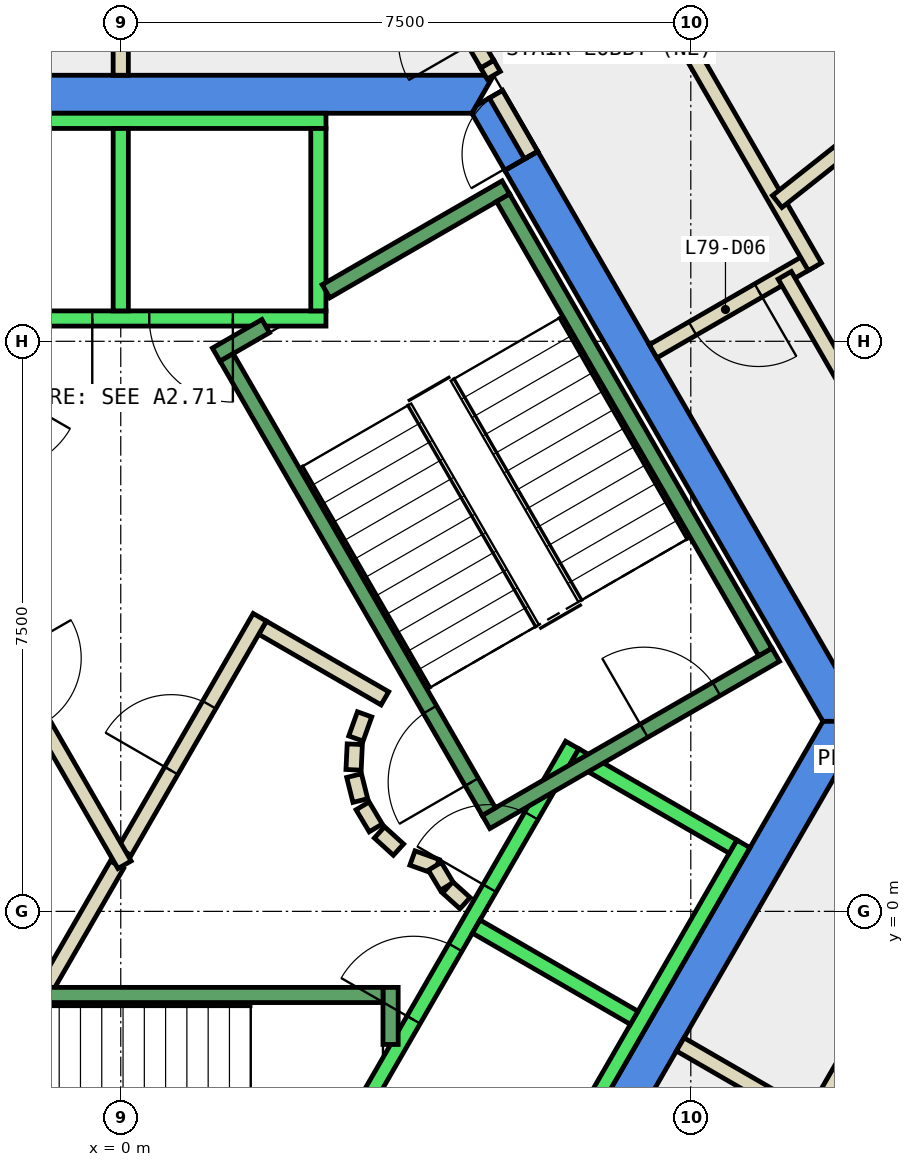
"""IFC4 building model, lengths in metres.
Left out: names, types, materials, properties, quantities, classifications, styles, units other than length and angle.
Written with IfcOpenShell. Run it as: python <this file> out.ifc"""

import sys

from ifc_helpers import new_model, si_unit, direction, frame, frame_2d, origin, place, context, subcontext, project, spatial, polyline, rectangle, outline, extrude, element, fill, save


model = new_model("IFC4")
c1 = context("Model", 3, precision=1e-05, world=origin(), true_north=direction((0.0, 1.0)))
c2 = subcontext(c1, "Body", "Model", "MODEL_VIEW")
j1 = project(units=[si_unit("LENGTHUNIT", "METRE"), si_unit("PLANEANGLEUNIT", "RADIAN")], contexts=[c1])
p1 = place(None, origin())
s1 = spatial("IfcSite", under=j1, at=p1, CompositionType="ELEMENT")
p2 = place(p1, origin())
s2 = spatial("IfcBuilding", under=s1, at=p2, CompositionType="ELEMENT")
p3 = place(p2, frame((0.0, 0.0, 335.9)))
s3 = spatial("IfcBuildingStorey", under=s2, at=p3, CompositionType="ELEMENT", Elevation=335.9)
p4 = place(p3, frame((0.0, 0.0, -0.35)))
e1 = element("IfcWall", 1, at=p4, inside=s3, PredefinedType="SHEAR", context=c2, shape_type="SweptSolid", body=[
    extrude(outline(polyline([(5.486, 9.998), (5.053, 9.748), (9.238, 2.5), (9.815, 2.5), (5.486, 9.998)])), origin(), (0.0, 0.0, 1.0), 4.4),
])
p5 = place(p3, frame((0.0, 0.0, 3.6)))
e2 = element("IfcWall", 2, at=p5, inside=s3, PredefinedType="SHEAR", context=c2, shape_type="SweptSolid", body=[
    extrude(outline(polyline([(5.022, 10.8), (4.677, 10.601), (4.619, 10.5), (5.053, 9.748), (5.486, 9.998), (5.022, 10.8)])), origin(), (0.0, 0.0, 1.0), 0.45),
])
p6 = place(p3, frame((0.0, 0.0, -0.35)))
e3 = element("IfcWall", 3, at=p6, inside=s3, PredefinedType="SHEAR", context=c2, shape_type="SweptSolid", body=[
    extrude(outline(polyline([(4.907, 11.0), (-4.907, 11.0), (-4.619, 10.5), (4.619, 10.5), (4.907, 11.0)])), origin(), (0.0, 0.0, 1.0), 4.4),
])
p7 = place(p3, frame((0.0, 0.0, -0.35)))
e4 = element("IfcWall", 4, at=p7, inside=s3, PredefinedType="SHEAR", context=c2, shape_type="SweptSolid", body=[
    extrude(outline(polyline([(4.907, -6.0), (9.815, 2.5), (9.238, 2.5), (4.619, -5.5), (4.907, -6.0)])), origin(), (0.0, 0.0, 1.0), 4.4),
])
p8 = place(p3, frame((-0.982, -1.0, 0.0), z_axis=(0.0, 0.0, 1.0), x_axis=(0.50024047865, 0.865886518847, 0.0)))
e5 = element("IfcWall", 5, at=p8, inside=s3, PredefinedType="PARTITIONING", context=c2, shape_type="SweptSolid", body=[
    extrude(rectangle(XDim=1.863, YDim=0.2, at=frame_2d((0.931, 0.0))), origin(), (0.0, 0.0, 1.0), 4.05),
])
p9 = place(p3, frame((1.866, 3.732, 0.0), z_axis=(0.0, 0.0, 1.0), x_axis=(0.866043361281, -0.499968895414, 0.0)))
e6 = element("IfcWall", 6, at=p9, inside=s3, PredefinedType="PARTITIONING", context=c2, shape_type="SweptSolid", body=[
    extrude(rectangle(XDim=1.858, YDim=0.2, at=frame_2d((0.929, 0.0))), origin(), (0.0, 0.0, 1.0), 4.05),
])
p10 = place(p3, frame((3.208, 2.592, 0.0), z_axis=(0.0, 0.0, 1.0), x_axis=(-0.337388820924, -0.941365382578, 0.0)))
e7 = element("IfcWall", 7, at=p10, inside=s3, PredefinedType="PARTITIONING", context=c2, shape_type="SweptSolid", body=[
    extrude(rectangle(XDim=0.338, YDim=0.2, at=frame_2d((0.169, 0.0))), origin(), (0.0, 0.0, 1.0), 4.05),
])
p11 = place(p3, frame((3.079, 2.199, 0.0), z_axis=(0.0, 0.0, 1.0), x_axis=(-0.047771483479, -0.998858290933, 0.0)))
e8 = element("IfcWall", 8, at=p11, inside=s3, PredefinedType="PARTITIONING", context=c2, shape_type="SweptSolid", body=[
    extrude(rectangle(XDim=0.337, YDim=0.2, at=frame_2d((0.169, 0.0))), origin(), (0.0, 0.0, 1.0), 4.05),
])
p12 = place(p3, frame((3.07, 1.786, 0.0), z_axis=(0.0, 0.0, 1.0), x_axis=(0.242705583207, -0.970099994784, 0.0)))
e9 = element("IfcWall", 9, at=p12, inside=s3, PredefinedType="PARTITIONING", context=c2, shape_type="SweptSolid", body=[
    extrude(rectangle(XDim=0.338, YDim=0.2, at=frame_2d((0.169, 0.0))), origin(), (0.0, 0.0, 1.0), 4.05),
])
for number, where, z_axis, x_axis in (
    (10, (3.182, 1.388, 0.0), (0.0, 0.0, 1.0), (0.512, -0.859, 0.0)),
    (11, (3.404, 1.039, 0.0), (0.0, 0.0, 1.0), (0.74, -0.672, 0.0)),
):
    element("IfcWall", number, at=place(p3, frame(where, z_axis=z_axis, x_axis=x_axis)), inside=s3, PredefinedType="PARTITIONING", context=c2, shape_type="SweptSolid", body=[
        extrude(rectangle(XDim=0.338, YDim=0.2, at=frame_2d((0.169, 0.0))), origin(), (0.0, 0.0, 1.0), 4.05),
    ])
p13 = place(p3, frame((3.838, 0.702, 0.0), z_axis=(0.0, 0.0, 1.0), x_axis=(0.941035081519, -0.338308993895, 0.0)))
e12 = element("IfcWall", 12, at=p13, inside=s3, PredefinedType="PARTITIONING", context=c2, shape_type="SweptSolid", body=[
    extrude(rectangle(XDim=0.337, YDim=0.2, at=frame_2d((0.168, 0.0))), origin(), (0.0, 0.0, 1.0), 4.05),
])
p14 = place(p3, frame((4.132, 0.593, 0.0), z_axis=(0.0, 0.0, 1.0), x_axis=(0.513561617048, -0.858052717201, 0.0)))
e13 = element("IfcWall", 13, at=p14, inside=s3, PredefinedType="PARTITIONING", context=c2, shape_type="SweptSolid", body=[
    extrude(rectangle(XDim=0.308, YDim=0.2, at=frame_2d((0.154, 0.0))), origin(), (0.0, 0.0, 1.0), 4.05),
])
p15 = place(p3, frame((4.301, 0.315, 0.0), z_axis=(0.0, 0.0, 1.0), x_axis=(0.741798017506, -0.670623367639, 0.0)))
e14 = element("IfcWall", 14, at=p15, inside=s3, PredefinedType="PARTITIONING", context=c2, shape_type="SweptSolid", body=[
    extrude(rectangle(XDim=0.309, YDim=0.2, at=frame_2d((0.154, 0.0))), origin(), (0.0, 0.0, 1.0), 4.05),
])
p16 = place(p3, frame((0.05, 0.787, 0.0), z_axis=(0.0, 0.0, 1.0), x_axis=(0.499954076797, 0.866051915934, 0.0)))
e15 = element("IfcWall", 15, at=p16, inside=s3, PredefinedType="PARTITIONING", context=c2, shape_type="SweptSolid", body=[
    extrude(rectangle(XDim=3.558, YDim=0.2, at=frame_2d((1.779, 0.0))), origin(), (0.0, 0.0, 1.0), 4.05),
])
p17 = place(p16, frame((1.229, 0.0, 0.0)))
e16 = element("IfcOpeningElement", 16, at=p17, cuts=e15, PredefinedType="OPENING", context=c2, shape_type="SweptSolid", body=[
    extrude(rectangle(XDim=1.0, YDim=2.1, at=frame_2d((0.5, 1.05))), frame((0.0, 0.11, 0.0), z_axis=(0.0, -1.0, 0.0), x_axis=(1.0, 0.0, 0.0)), (0.0, 0.0, 1.0), 0.22),
])
p18 = place(p3, frame((-2.54, 5.1, 0.0), z_axis=(0.0, 0.0, 1.0), x_axis=(0.499925051871, -0.866068670783, 0.0)))
e17 = element("IfcWall", 17, at=p18, inside=s3, PredefinedType="PARTITIONING", context=c2, shape_type="SweptSolid", body=[
    extrude(rectangle(XDim=5.181, YDim=0.2, at=frame_2d((2.59, 0.0))), origin(), (0.0, 0.0, 1.0), 4.05),
])
p19 = place(p18, frame((2.04, 0.0, 0.0)))
e18 = element("IfcOpeningElement", 18, at=p19, cuts=e17, PredefinedType="OPENING", context=c2, shape_type="SweptSolid", body=[
    extrude(rectangle(XDim=1.0, YDim=2.1, at=frame_2d((0.5, 1.05))), frame((0.0, 0.11, 0.0), z_axis=(0.0, -1.0, 0.0), x_axis=(1.0, 0.0, 0.0)), (0.0, 0.0, 1.0), 0.22),
])
p20 = place(p3, frame((7.361, -1.75, 0.0), z_axis=(0.0, 0.0, 1.0), x_axis=(0.865980106173, -0.500078449558, 0.0)))
e19 = element("IfcWall", 19, at=p20, inside=s3, PredefinedType="PARTITIONING", context=c2, shape_type="SweptSolid", body=[
    extrude(rectangle(XDim=1.9, YDim=0.2, at=frame_2d((0.95, 0.0))), origin(), (0.0, 0.0, 1.0), 4.05),
])
p21 = place(p3, frame((9.082, 8.568, 0.0), z_axis=(0.0, 0.0, 1.0), x_axis=(-0.865955154139, -0.50012165622, 0.0)))
e20 = element("IfcWall", 20, at=p21, inside=s3, PredefinedType="PARTITIONING", context=c2, shape_type="SweptSolid", body=[
    extrude(rectangle(XDim=2.4, YDim=0.2, at=frame_2d((1.2, 0.0))), origin(), (0.0, 0.0, 1.0), 4.05),
])
p22 = place(p21, frame((0.8, 0.0, 0.0)))
e21 = element("IfcOpeningElement", 21, at=p22, cuts=e20, PredefinedType="OPENING", context=c2, shape_type="SweptSolid", body=[
    extrude(rectangle(XDim=1.0, YDim=2.1, at=frame_2d((0.5, 1.05))), frame((0.0, 0.11, 0.0), z_axis=(0.0, -1.0, 0.0), x_axis=(1.0, 0.0, 0.0)), (0.0, 0.0, 1.0), 0.22),
])
p23 = place(p3, frame((4.907, 11.0, 0.0), z_axis=(0.0, 0.0, 1.0), x_axis=(-0.5004692653, 0.865754303766, 0.0)))
e22 = element("IfcWall", 22, at=p23, inside=s3, PredefinedType="PARTITIONING", context=c2, shape_type="SweptSolid", body=[
    extrude(rectangle(XDim=0.17, YDim=0.2, at=frame_2d((0.085, 0.0))), origin(), (0.0, 0.0, 1.0), 2.4),
])
p24 = place(p3, frame((8.736, 8.368, 0.0), z_axis=(0.0, 0.0, 1.0), x_axis=(0.500206302225, -0.865906262372, 0.0)))
e23 = element("IfcWall", 23, at=p24, inside=s3, PredefinedType="PARTITIONING", context=c2, shape_type="SweptSolid", body=[
    extrude(rectangle(XDim=2.111, YDim=0.2, at=frame_2d((1.055, 0.0))), origin(), (0.0, 0.0, 1.0), 4.05),
])
p25 = place(p3, frame((0.0, 11.0, 0.0), z_axis=(0.0, 0.0, 1.0), x_axis=(0.0, 1.0, 0.0)))
e24 = element("IfcWall", 24, at=p25, inside=s3, PredefinedType="PARTITIONING", context=c2, shape_type="SweptSolid", body=[
    extrude(rectangle(XDim=1.9, YDim=0.2, at=frame_2d((0.95, 0.0))), origin(), (0.0, 0.0, 1.0), 1.95),
])
p26 = place(p3, frame((5.399, 9.948, 0.0), z_axis=(0.0, 0.0, 1.0), x_axis=(-0.499882215713, 0.866093395895, 0.0)))
e25 = element("IfcWall", 25, at=p26, inside=s3, PredefinedType="PARTITIONING", context=c2, shape_type="SweptSolid", body=[
    extrude(rectangle(XDim=0.926, YDim=0.2, at=frame_2d((0.463, 0.0))), origin(), (0.0, 0.0, 1.0), 2.4),
])
p27 = place(p26, frame((0.017, 0.0, 0.0)))
e26 = element("IfcOpeningElement", 26, at=p27, cuts=e25, PredefinedType="OPENING", context=c2, shape_type="SweptSolid", body=[
    extrude(rectangle(XDim=0.9, YDim=2.1, at=frame_2d((0.45, 1.05))), frame((0.0, 0.11, 0.0), z_axis=(0.0, -1.0, 0.0), x_axis=(1.0, 0.0, 0.0)), (0.0, 0.0, 1.0), 0.22),
])
p28 = place(p3, frame((4.822, 11.147, 0.0), z_axis=(0.0, 0.0, 1.0), x_axis=(-0.499871764879, 0.866099427708, 0.0)))
e27 = element("IfcWall", 27, at=p28, inside=s3, PredefinedType="PARTITIONING", context=c2, shape_type="SweptSolid", body=[
    extrude(rectangle(XDim=2.737, YDim=0.2, at=frame_2d((1.368, 0.0))), origin(), (0.0, 0.0, 1.0), 4.05),
])
p29 = place(p28, frame((0.335, 0.0, 0.0)))
e28 = element("IfcOpeningElement", 28, at=p29, cuts=e27, PredefinedType="OPENING", context=c2, shape_type="SweptSolid", body=[
    extrude(rectangle(XDim=1.0, YDim=2.1, at=frame_2d((0.5, 1.05))), frame((0.0, 0.11, 0.0), z_axis=(0.0, -1.0, 0.0), x_axis=(1.0, 0.0, 0.0)), (0.0, 0.0, 1.0), 0.22),
])
p30 = place(p3, frame((7.43, 11.429, 0.0), z_axis=(0.0, 0.0, 1.0), x_axis=(0.500026652407, -0.866010015463, 0.0)))
e29 = element("IfcWall", 29, at=p30, inside=s3, PredefinedType="PARTITIONING", context=c2, shape_type="SweptSolid", body=[
    extrude(rectangle(XDim=3.404, YDim=0.2, at=frame_2d((1.702, 0.0))), origin(), (0.0, 0.0, 1.0), 4.05),
])
p31 = place(p3, frame((9.548, -1.962, 0.0), z_axis=(0.0, 0.0, 1.0), x_axis=(-0.500063042646, -0.865989003036, 0.0)))
e30 = element("IfcWall", 30, at=p31, inside=s3, PredefinedType="PARTITIONING", context=c2, shape_type="SweptSolid", body=[
    extrude(rectangle(XDim=0.91, YDim=0.2, at=frame_2d((0.455, 0.0))), origin(), (0.0, 0.0, 1.0), 4.05),
])
p32 = place(p3, frame((11.007, 11.215, 0.0), z_axis=(0.0, 0.0, 1.0), x_axis=(-0.784104781382, -0.620628465198, 0.0)))
e31 = element("IfcWall", 31, at=p32, inside=s3, PredefinedType="PARTITIONING", context=c2, shape_type="SweptSolid", body=[
    extrude(rectangle(XDim=3.023, YDim=0.2, at=frame_2d((1.511, 0.0))), origin(), (0.0, 0.0, 1.0), 4.05),
])
p33 = place(p3, frame((2.7, 7.8, 0.0), z_axis=(0.0, 0.0, 1.0), x_axis=(-1.0, 0.0, 0.0)))
e32 = element("IfcWall", 32, at=p33, inside=s3, PredefinedType="STANDARD", context=c2, shape_type="SweptSolid", body=[
    extrude(rectangle(XDim=5.4, YDim=0.2, at=frame_2d((2.7, 0.0))), origin(), (0.0, 0.0, 1.0), 4.05),
])
p34 = place(p33, frame((1.225, 0.0, 0.0)))
e33 = element("IfcOpeningElement", 33, at=p34, cuts=e32, PredefinedType="OPENING", context=c2, shape_type="SweptSolid", body=[
    extrude(rectangle(XDim=1.1, YDim=2.1, at=frame_2d((0.55, 1.05))), frame((0.0, 0.11, 0.0), z_axis=(0.0, -1.0, 0.0), x_axis=(1.0, 0.0, 0.0)), (0.0, 0.0, 1.0), 0.22),
])
p35 = place(p33, frame((3.075, 0.0, 0.0)))
e34 = element("IfcOpeningElement", 34, at=p35, cuts=e32, PredefinedType="OPENING", context=c2, shape_type="SweptSolid", body=[
    extrude(rectangle(XDim=1.1, YDim=2.1, at=frame_2d((0.55, 1.05))), frame((0.0, 0.11, 0.0), z_axis=(0.0, -1.0, 0.0), x_axis=(1.0, 0.0, 0.0)), (0.0, 0.0, 1.0), 0.22),
])
p36 = place(p3, frame((2.7, 10.4, 0.0), z_axis=(0.0, 0.0, 1.0), x_axis=(-1.0, 0.0, 0.0)))
e35 = element("IfcWall", 35, at=p36, inside=s3, PredefinedType="STANDARD", context=c2, shape_type="SweptSolid", body=[
    extrude(rectangle(XDim=5.4, YDim=0.2, at=frame_2d((2.7, 0.0))), origin(), (0.0, 0.0, 1.0), 4.05),
])
for number, where, z_axis, x_axis in (
    (36, (2.6, 7.9, 0.0), (0.0, 0.0, 1.0), (0.0, 1.0, 0.0)),
    (37, (0.0, 7.9, 0.0), (0.0, 0.0, 1.0), (0.0, 1.0, 0.0)),
):
    element("IfcWall", number, at=place(p3, frame(where, z_axis=z_axis, x_axis=x_axis)), inside=s3, PredefinedType="STANDARD", context=c2, shape_type="SweptSolid", body=[
        extrude(rectangle(XDim=2.4, YDim=0.2, at=frame_2d((1.2, 0.0))), origin(), (0.0, 0.0, 1.0), 4.05),
    ])
p37 = place(p3, frame((3.24, -2.488, 0.0), z_axis=(0.0, 0.0, 1.0), x_axis=(0.500034260056, 0.866005622828, 0.0)))
e38 = element("IfcWall", 38, at=p37, inside=s3, PredefinedType="STANDARD", context=c2, shape_type="SweptSolid", body=[
    extrude(rectangle(XDim=5.399, YDim=0.2, at=frame_2d((2.7, 0.0))), origin(), (0.0, 0.0, 1.0), 4.05),
])
p38 = place(p37, frame((3.225, 0.0, 0.0)))
e39 = element("IfcOpeningElement", 39, at=p38, cuts=e38, PredefinedType="OPENING", context=c2, shape_type="SweptSolid", body=[
    extrude(rectangle(XDim=1.1, YDim=2.1, at=frame_2d((0.55, 1.05))), frame((0.0, 0.11, 0.0), z_axis=(0.0, -1.0, 0.0), x_axis=(1.0, 0.0, 0.0)), (0.0, 0.0, 1.0), 0.22),
])
p39 = place(p37, frame((1.225, 0.0, 0.0)))
e40 = element("IfcOpeningElement", 40, at=p39, cuts=e38, PredefinedType="OPENING", context=c2, shape_type="SweptSolid", body=[
    extrude(rectangle(XDim=1.1, YDim=2.1, at=frame_2d((0.55, 1.05))), frame((0.0, 0.11, 0.0), z_axis=(0.0, -1.0, 0.0), x_axis=(1.0, 0.0, 0.0)), (0.0, 0.0, 1.0), 0.22),
])
p40 = place(p3, frame((5.492, -3.788, 0.0), z_axis=(0.0, 0.0, 1.0), x_axis=(0.500034260056, 0.866005622828, 0.0)))
e41 = element("IfcWall", 41, at=p40, inside=s3, PredefinedType="STANDARD", context=c2, shape_type="SweptSolid", body=[
    extrude(rectangle(XDim=5.399, YDim=0.2, at=frame_2d((2.7, 0.0))), origin(), (0.0, 0.0, 1.0), 4.05),
])
for number, where, z_axis, x_axis in (
    (42, (4.677, -0.2, 0.0), (0.0, 0.0, 1.0), (0.866, -0.5, 0.0)),
    (43, (5.977, 2.052, 0.0), (0.0, 0.0, 1.0), (0.866, -0.5, 0.0)),
):
    element("IfcWall", number, at=place(p3, frame(where, z_axis=z_axis, x_axis=x_axis)), inside=s3, PredefinedType="STANDARD", context=c2, shape_type="SweptSolid", body=[
        extrude(rectangle(XDim=2.399, YDim=0.2, at=frame_2d((1.2, 0.0))), origin(), (0.0, 0.0, 1.0), 4.05),
    ])
p41 = place(p3, frame((3.55, -1.0, 0.0), z_axis=(0.0, 0.0, 1.0), x_axis=(0.0, -1.0, 0.0)))
e44 = element("IfcWall", 44, at=p41, inside=s3, PredefinedType="STANDARD", context=c2, shape_type="SweptSolid", body=[
    extrude(rectangle(XDim=0.751, YDim=0.2, at=frame_2d((0.375, 0.0))), origin(), (0.0, 0.0, 1.0), 4.05),
])
p42 = place(p3, frame((-3.45, -1.1, 0.0), z_axis=(0.0, 0.0, 1.0), x_axis=(1.0, 0.0, 0.0)))
e45 = element("IfcWall", 45, at=p42, inside=s3, PredefinedType="STANDARD", context=c2, shape_type="SweptSolid", body=[
    extrude(rectangle(XDim=6.9, YDim=0.2, at=frame_2d((3.45, 0.0))), origin(), (0.0, 0.0, 1.0), 4.05),
])
p43 = place(p42, frame((0.45, 0.0, 0.0)))
e46 = element("IfcOpeningElement", 46, at=p43, cuts=e45, PredefinedType="OPENING", context=c2, shape_type="SweptSolid", body=[
    extrude(rectangle(XDim=1.1, YDim=2.2, at=frame_2d((0.55, 1.1))), frame((0.0, 0.11, 0.0), z_axis=(0.0, -1.0, 0.0), x_axis=(1.0, 0.0, 0.0)), (0.0, 0.0, 1.0), 0.22),
])
p44 = place(p3, frame((4.806, 1.176, 0.0), z_axis=(0.0, 0.0, 1.0), x_axis=(0.866059941101, 0.499940174841, 0.0)))
e47 = element("IfcWall", 47, at=p44, inside=s3, PredefinedType="STANDARD", context=c2, shape_type="SweptSolid", body=[
    extrude(rectangle(XDim=4.4, YDim=0.2, at=frame_2d((2.2, 0.0))), origin(), (0.0, 0.0, 1.0), 4.05),
])
p45 = place(p44, frame((2.4, 0.0, 0.0)))
e48 = element("IfcOpeningElement", 48, at=p45, cuts=e47, PredefinedType="OPENING", context=c2, shape_type="SweptSolid", body=[
    extrude(rectangle(XDim=1.1, YDim=2.2, at=frame_2d((0.55, 1.1))), frame((0.0, 0.11, 0.0), z_axis=(0.0, -1.0, 0.0), x_axis=(1.0, 0.0, 0.0)), (0.0, 0.0, 1.0), 0.22),
])
p46 = place(p3, frame((2.7, 8.158, 0.0), z_axis=(0.0, 0.0, 1.0), x_axis=(0.86611865017, 0.499838457731, 0.0)))
e49 = element("IfcWall", 49, at=p46, inside=s3, PredefinedType="STANDARD", context=c2, shape_type="SweptSolid", body=[
    extrude(rectangle(XDim=2.733, YDim=0.2, at=frame_2d((1.366, 0.0))), origin(), (0.0, 0.0, 1.0), 4.05),
])
p47 = place(p3, frame((1.256, 7.324, 0.0), z_axis=(0.0, 0.0, 1.0), x_axis=(0.865915093549, 0.500191014278, 0.0)))
e50 = element("IfcWall", 50, at=p47, inside=s3, PredefinedType="STANDARD", context=c2, shape_type="SweptSolid", body=[
    extrude(rectangle(XDim=0.752, YDim=0.2, at=frame_2d((0.376, 0.0))), origin(), (0.0, 0.0, 1.0), 4.05),
])
p48 = place(p3, frame((4.843, 1.312, 0.0), z_axis=(0.0, 0.0, 1.0), x_axis=(-0.499963383562, 0.866046543262, 0.0)))
e51 = element("IfcWall", 51, at=p48, inside=s3, PredefinedType="STANDARD", context=c2, shape_type="SweptSolid", body=[
    extrude(rectangle(XDim=6.9, YDim=0.2, at=frame_2d((3.45, 0.0))), origin(), (0.0, 0.0, 1.0), 4.05),
])
p49 = place(p48, frame((0.45, 0.0, 0.0)))
e52 = element("IfcOpeningElement", 52, at=p49, cuts=e51, PredefinedType="OPENING", context=c2, shape_type="SweptSolid", body=[
    extrude(rectangle(XDim=1.1, YDim=2.2, at=frame_2d((0.55, 1.1))), frame((0.0, 0.11, 0.0), z_axis=(0.0, -1.0, 0.0), x_axis=(1.0, 0.0, 0.0)), (0.0, 0.0, 1.0), 0.22),
])
p50 = place(p3, frame((8.48, 3.412, 0.0), z_axis=(0.0, 0.0, 1.0), x_axis=(-0.499978703459, 0.866037698999, 0.0)))
e53 = element("IfcWall", 53, at=p50, inside=s3, PredefinedType="STANDARD", context=c2, shape_type="SweptSolid", body=[
    extrude(rectangle(XDim=6.9, YDim=0.2, at=frame_2d((3.45, 0.0))), origin(), (0.0, 0.0, 1.0), 4.05),
])
p51 = place(p22, origin())
e54 = element("IfcDoor", 54, at=p51, inside=s3, OperationType="SINGLE_SWING_LEFT", PredefinedType="DOOR", context=c2, shape_type="SweptSolid", body=[
    extrude(rectangle(XDim=1.0, YDim=2.1, at=frame_2d((0.5, 1.05))), frame((0.0, 0.025, 0.0), z_axis=(0.0, -1.0, 0.0), x_axis=(1.0, 0.0, 0.0)), (0.0, 0.0, 1.0), 0.05),
])
fill(e21, e54)
p52 = place(p17, origin())
e55 = element("IfcDoor", 55, at=p52, inside=s3, OperationType="SINGLE_SWING_RIGHT", PredefinedType="DOOR", context=c2, shape_type="SweptSolid", body=[
    extrude(rectangle(XDim=1.0, YDim=2.1, at=frame_2d((0.5, 1.05))), frame((0.0, 0.025, 0.0), z_axis=(0.0, -1.0, 0.0), x_axis=(1.0, 0.0, 0.0)), (0.0, 0.0, 1.0), 0.05),
])
fill(e16, e55)
p53 = place(p27, origin())
e56 = element("IfcDoor", 56, at=p53, inside=s3, OperationType="SINGLE_SWING_LEFT", PredefinedType="DOOR", context=c2, shape_type="SweptSolid", body=[
    extrude(rectangle(XDim=0.9, YDim=2.1, at=frame_2d((0.45, 1.05))), frame((0.0, 0.025, 0.0), z_axis=(0.0, -1.0, 0.0), x_axis=(1.0, 0.0, 0.0)), (0.0, 0.0, 1.0), 0.05),
])
fill(e26, e56)
p54 = place(p34, origin())
e57 = element("IfcDoor", 57, at=p54, inside=s3, OperationType="SLIDING_TO_LEFT", PredefinedType="DOOR", context=c2, shape_type="SweptSolid", body=[
    extrude(rectangle(XDim=1.1, YDim=2.1, at=frame_2d((0.55, 1.05))), frame((0.0, 0.025, 0.0), z_axis=(0.0, -1.0, 0.0), x_axis=(1.0, 0.0, 0.0)), (0.0, 0.0, 1.0), 0.05),
])
fill(e33, e57)
p55 = place(p35, origin())
e58 = element("IfcDoor", 58, at=p55, inside=s3, OperationType="SLIDING_TO_LEFT", PredefinedType="DOOR", context=c2, shape_type="SweptSolid", body=[
    extrude(rectangle(XDim=1.1, YDim=2.1, at=frame_2d((0.55, 1.05))), frame((0.0, 0.025, 0.0), z_axis=(0.0, -1.0, 0.0), x_axis=(1.0, 0.0, 0.0)), (0.0, 0.0, 1.0), 0.05),
])
fill(e34, e58)
p56 = place(p38, origin())
e59 = element("IfcDoor", 59, at=p56, inside=s3, OperationType="SLIDING_TO_LEFT", PredefinedType="DOOR", context=c2, shape_type="SweptSolid", body=[
    extrude(rectangle(XDim=1.1, YDim=2.1, at=frame_2d((0.55, 1.05))), frame((0.0, 0.025, 0.0), z_axis=(0.0, -1.0, 0.0), x_axis=(1.0, 0.0, 0.0)), (0.0, 0.0, 1.0), 0.05),
])
fill(e39, e59)
p57 = place(p39, origin())
e60 = element("IfcDoor", 60, at=p57, inside=s3, OperationType="SLIDING_TO_LEFT", PredefinedType="DOOR", context=c2, shape_type="SweptSolid", body=[
    extrude(rectangle(XDim=1.1, YDim=2.1, at=frame_2d((0.55, 1.05))), frame((0.0, 0.025, 0.0), z_axis=(0.0, -1.0, 0.0), x_axis=(1.0, 0.0, 0.0)), (0.0, 0.0, 1.0), 0.05),
])
fill(e40, e60)
p58 = place(p49, origin())
e61 = element("IfcDoor", 61, at=p58, inside=s3, OperationType="SINGLE_SWING_LEFT", PredefinedType="DOOR", context=c2, shape_type="SweptSolid", body=[
    extrude(rectangle(XDim=1.1, YDim=2.2, at=frame_2d((0.55, 1.1))), frame((0.0, 0.025, 0.0), z_axis=(0.0, -1.0, 0.0), x_axis=(1.0, 0.0, 0.0)), (0.0, 0.0, 1.0), 0.05),
])
fill(e52, e61)
p59 = place(p45, origin())
e62 = element("IfcDoor", 62, at=p59, inside=s3, OperationType="SINGLE_SWING_LEFT", PredefinedType="DOOR", context=c2, shape_type="SweptSolid", body=[
    extrude(rectangle(XDim=1.1, YDim=2.2, at=frame_2d((0.55, 1.1))), frame((0.0, 0.025, 0.0), z_axis=(0.0, -1.0, 0.0), x_axis=(1.0, 0.0, 0.0)), (0.0, 0.0, 1.0), 0.05),
])
fill(e48, e62)
save(model, sys.argv[1])
